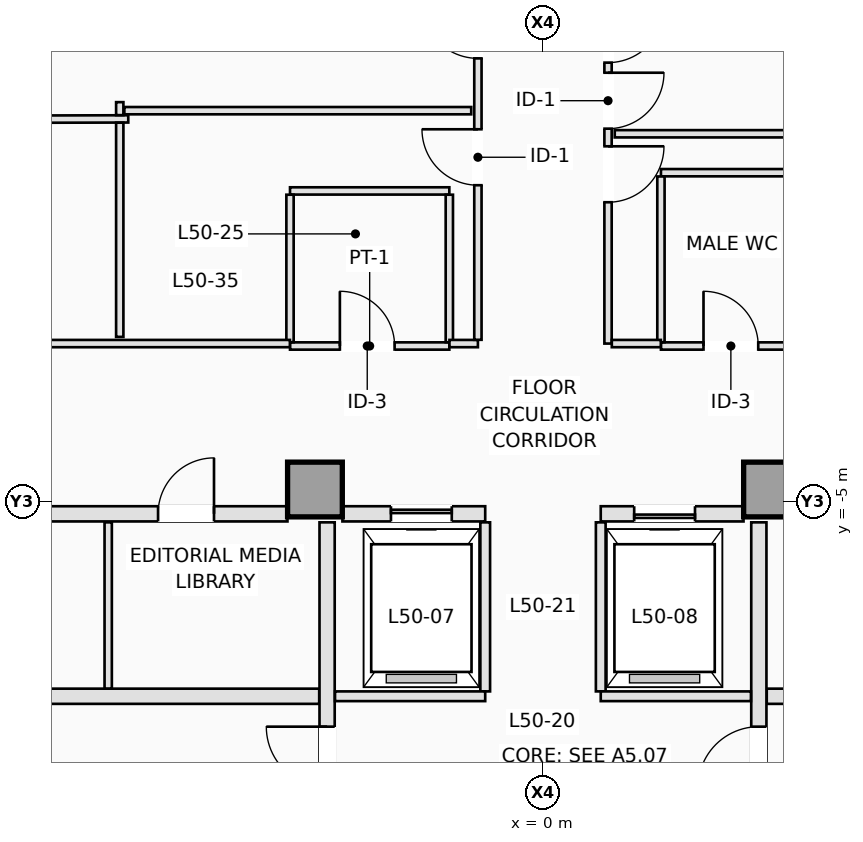
"""IFC4 building model, lengths in metres.
Left out: names, types, materials, properties, quantities, classifications, styles, units other than length and angle.
Written with IfcOpenShell. Run it as: python <this file> out.ifc"""

import sys

from ifc_helpers import new_model, si_unit, direction, frame, frame_2d, origin, origin_2d, place, context, subcontext, project, spatial, rectangle, extrude, element, fill, save


model = new_model("IFC4")
c1 = context("Model", 3, precision=1e-05, world=origin(), true_north=direction((0.0, 1.0)))
c2 = subcontext(c1, "Body", "Model", "MODEL_VIEW")
j1 = project(units=[si_unit("LENGTHUNIT", "METRE"), si_unit("PLANEANGLEUNIT", "RADIAN")], contexts=[c1])
p1 = place(None, origin())
s1 = spatial("IfcSite", under=j1, at=p1, CompositionType="ELEMENT")
p2 = place(p1, origin())
s2 = spatial("IfcBuilding", under=s1, at=p2, CompositionType="ELEMENT")
p3 = place(p2, frame((0.0, 0.0, 183.4)))
s3 = spatial("IfcBuildingStorey", under=s2, at=p3, CompositionType="ELEMENT", Elevation=183.4)
for number, where, z_axis, x_axis in (
    (1, (-3.75, -4.8, 0.0), (0.0, 0.0, 1.0), (1.0, 0.0, 0.0)),
    (2, (3.75, -4.8, 0.0), (0.0, 0.0, 1.0), (1.0, 0.0, 0.0)),
):
    element("IfcColumn", number, at=place(p3, frame(where, z_axis=z_axis, x_axis=x_axis)), inside=s3, PredefinedType="COLUMN", context=c2, shape_type="SweptSolid", body=[
        extrude(rectangle(XDim=0.9, YDim=0.9, at=origin_2d()), origin(), (0.0, 0.0, 1.0), 3.5),
    ])
for number, where, z_axis, x_axis in (
    (3, (-8.92, -8.2, 0.0), (0.0, 0.0, 1.0), (1.0, 0.0, 0.0)),
    (4, (3.68, -8.2, 0.0), (0.0, 0.0, 1.0), (1.0, 0.0, 0.0)),
):
    element("IfcWall", number, at=place(p3, frame(where, z_axis=z_axis, x_axis=x_axis)), inside=s3, PredefinedType="PARTITIONING", context=c2, shape_type="SweptSolid", body=[
        extrude(rectangle(XDim=5.24, YDim=0.25, at=frame_2d((2.62, 0.0))), origin(), (0.0, 0.0, 1.0), 3.25),
    ])
p4 = place(p3, frame((-3.55, -15.898, 0.0), z_axis=(0.0, 0.0, 1.0), x_axis=(0.0, 1.0, 0.0)))
e5 = element("IfcWall", 5, at=p4, inside=s3, PredefinedType="PARTITIONING", context=c2, shape_type="SweptSolid", body=[
    extrude(rectangle(XDim=10.558, YDim=0.25, at=frame_2d((5.279, 0.0))), origin(), (0.0, 0.0, 1.0), 3.25),
])
p5 = place(p4, frame((6.198, 0.0, 0.0)))
e6 = element("IfcOpeningElement", 6, at=p5, cuts=e5, PredefinedType="OPENING", context=c2, shape_type="SweptSolid", body=[
    extrude(rectangle(XDim=1.0, YDim=2.15, at=frame_2d((0.5, 1.075))), frame((0.0, 0.135, 0.0), z_axis=(0.0, -1.0, 0.0), x_axis=(1.0, 0.0, 0.0)), (0.0, 0.0, 1.0), 0.27),
])
p6 = place(p3, frame((3.55, -15.898, 0.0), z_axis=(0.0, 0.0, 1.0), x_axis=(0.0, 1.0, 0.0)))
e7 = element("IfcWall", 7, at=p6, inside=s3, PredefinedType="PARTITIONING", context=c2, shape_type="SweptSolid", body=[
    extrude(rectangle(XDim=10.558, YDim=0.25, at=frame_2d((5.279, 0.0))), origin(), (0.0, 0.0, 1.0), 3.25),
])
p7 = place(p6, frame((6.198, 0.0, 0.0)))
e8 = element("IfcOpeningElement", 8, at=p7, cuts=e7, PredefinedType="OPENING", context=c2, shape_type="SweptSolid", body=[
    extrude(rectangle(XDim=1.0, YDim=2.15, at=frame_2d((0.5, 1.075))), frame((0.0, 0.135, 0.0), z_axis=(0.0, -1.0, 0.0), x_axis=(1.0, 0.0, 0.0)), (0.0, 0.0, 1.0), 0.27),
])
p8 = place(p3, frame((-12.48, -5.2, 0.0), z_axis=(0.0, 0.0, 1.0), x_axis=(1.0, 0.0, 0.0)))
e9 = element("IfcWall", 9, at=p8, inside=s3, PredefinedType="PARTITIONING", context=c2, shape_type="SweptSolid", body=[
    extrude(rectangle(XDim=8.278, YDim=0.25, at=frame_2d((4.139, 0.0))), origin(), (0.0, 0.0, 1.0), 3.25),
])
p9 = place(p8, frame((3.05, 0.0, 0.0)))
e10 = element("IfcOpeningElement", 10, at=p9, cuts=e9, PredefinedType="OPENING", context=c2, shape_type="SweptSolid", body=[
    extrude(rectangle(XDim=0.92, YDim=2.12, at=frame_2d((0.46, 1.06))), frame((0.0, 0.135, 0.0), z_axis=(0.0, -1.0, 0.0), x_axis=(1.0, 0.0, 0.0)), (0.0, 0.0, 1.0), 0.27),
])
p10 = place(p8, frame((6.15, 0.0, 0.0)))
e11 = element("IfcOpeningElement", 11, at=p10, cuts=e9, PredefinedType="OPENING", context=c2, shape_type="SweptSolid", body=[
    extrude(rectangle(XDim=0.92, YDim=2.12, at=frame_2d((0.46, 1.06))), frame((0.0, 0.135, 0.0), z_axis=(0.0, -1.0, 0.0), x_axis=(1.0, 0.0, 0.0)), (0.0, 0.0, 1.0), 0.27),
])
p11 = place(p3, frame((-3.298, -5.2, 0.0), z_axis=(0.0, 0.0, 1.0), x_axis=(1.0, 0.0, 0.0)))
e12 = element("IfcWall", 12, at=p11, inside=s3, PredefinedType="PARTITIONING", context=c2, shape_type="SweptSolid", body=[
    extrude(rectangle(XDim=2.348, YDim=0.25, at=frame_2d((1.174, 0.0))), origin(), (0.0, 0.0, 1.0), 3.25),
])
p12 = place(p11, frame((0.798, 0.0, 0.0)))
e13 = element("IfcOpeningElement", 13, at=p12, cuts=e12, PredefinedType="OPENING", context=c2, shape_type="SweptSolid", body=[
    extrude(rectangle(XDim=1.0, YDim=2.15, at=frame_2d((0.5, 1.075))), frame((0.0, 0.135, 0.0), z_axis=(0.0, -1.0, 0.0), x_axis=(1.0, 0.0, 0.0)), (0.0, 0.0, 1.0), 0.27),
])
p13 = place(p3, frame((0.95, -5.2, 0.0), z_axis=(0.0, 0.0, 1.0), x_axis=(1.0, 0.0, 0.0)))
e14 = element("IfcWall", 14, at=p13, inside=s3, PredefinedType="PARTITIONING", context=c2, shape_type="SweptSolid", body=[
    extrude(rectangle(XDim=2.348, YDim=0.25, at=frame_2d((1.174, 0.0))), origin(), (0.0, 0.0, 1.0), 3.25),
])
p14 = place(p13, frame((0.55, 0.0, 0.0)))
e15 = element("IfcOpeningElement", 15, at=p14, cuts=e14, PredefinedType="OPENING", context=c2, shape_type="SweptSolid", body=[
    extrude(rectangle(XDim=1.0, YDim=2.15, at=frame_2d((0.5, 1.075))), frame((0.0, 0.135, 0.0), z_axis=(0.0, -1.0, 0.0), x_axis=(1.0, 0.0, 0.0)), (0.0, 0.0, 1.0), 0.27),
])
p15 = place(p3, frame((-7.15, -8.073, 0.0), z_axis=(0.0, 0.0, 1.0), x_axis=(0.0, 1.0, 0.0)))
e16 = element("IfcWall", 16, at=p15, inside=s3, PredefinedType="PARTITIONING", context=c2, shape_type="SweptSolid", body=[
    extrude(rectangle(XDim=2.733, YDim=0.12, at=frame_2d((1.366, 0.0))), origin(), (0.0, 0.0, 1.0), 3.25),
])
for number, where, z_axis, x_axis in (
    (17, (-0.95, -8.12, 0.0), (0.0, 0.0, 1.0), (0.0, 1.0, 0.0)),
    (18, (0.95, -8.12, 0.0), (0.0, 0.0, 1.0), (0.0, 1.0, 0.0)),
):
    element("IfcWall", number, at=place(p3, frame(where, z_axis=z_axis, x_axis=x_axis)), inside=s3, PredefinedType="PARTITIONING", context=c2, shape_type="SweptSolid", body=[
        extrude(rectangle(XDim=2.78, YDim=0.16, at=frame_2d((1.39, 0.0))), origin(), (0.0, 0.0, 1.0), 3.25),
    ])
for number, where, z_axis, x_axis in (
    (19, (-3.42, -8.2, 0.0), (0.0, 0.0, 1.0), (1.0, 0.0, 0.0)),
    (20, (0.95, -8.2, 0.0), (0.0, 0.0, 1.0), (1.0, 0.0, 0.0)),
):
    element("IfcWall", number, at=place(p3, frame(where, z_axis=z_axis, x_axis=x_axis)), inside=s3, PredefinedType="PARTITIONING", context=c2, shape_type="SweptSolid", body=[
        extrude(rectangle(XDim=2.47, YDim=0.16, at=frame_2d((1.235, 0.0))), origin(), (0.0, 0.0, 1.0), 3.25),
    ])
p16 = place(p3, frame((-4.16, -2.44, 0.0), z_axis=(0.0, 0.0, 1.0), x_axis=(1.0, 0.0, 0.0)))
e21 = element("IfcWall", 21, at=p16, inside=s3, PredefinedType="PARTITIONING", context=c2, shape_type="SweptSolid", body=[
    extrude(rectangle(XDim=2.62, YDim=0.12, at=frame_2d((1.31, 0.0))), origin(), (0.0, 0.0, 1.0), 2.943),
])
p17 = place(p16, frame((0.82, 0.0, 0.0)))
e22 = element("IfcOpeningElement", 22, at=p17, cuts=e21, PredefinedType="OPENING", context=c2, shape_type="SweptSolid", body=[
    extrude(rectangle(XDim=0.9, YDim=2.12, at=frame_2d((0.45, 1.06))), frame((0.0, 0.07, 0.0), z_axis=(0.0, -1.0, 0.0), x_axis=(1.0, 0.0, 0.0)), (0.0, 0.0, 1.0), 0.14),
])
p18 = place(p3, frame((-4.16, 0.11, 0.0), z_axis=(0.0, 0.0, 1.0), x_axis=(1.0, 0.0, 0.0)))
e23 = element("IfcWall", 23, at=p18, inside=s3, PredefinedType="PARTITIONING", context=c2, shape_type="SweptSolid", body=[
    extrude(rectangle(XDim=2.62, YDim=0.12, at=frame_2d((1.31, 0.0))), origin(), (0.0, 0.0, 1.0), 3.25),
])
for number, where, z_axis, x_axis in (
    (24, (-4.16, -2.378, 0.0), (0.0, 0.0, 1.0), (0.0, 1.0, 0.0)),
    (25, (-1.54, -2.378, 0.0), (0.0, 0.0, 1.0), (0.0, 1.0, 0.0)),
):
    element("IfcWall", number, at=place(p3, frame(where, z_axis=z_axis, x_axis=x_axis)), inside=s3, PredefinedType="PARTITIONING", context=c2, shape_type="SweptSolid", body=[
        extrude(rectangle(XDim=2.426, YDim=0.12, at=frame_2d((1.213, 0.0))), origin(), (0.0, 0.0, 1.0), 3.25),
    ])
p19 = place(p3, frame((1.94, -2.44, 0.0), z_axis=(0.0, 0.0, 1.0), x_axis=(1.0, 0.0, 0.0)))
e26 = element("IfcWall", 26, at=p19, inside=s3, PredefinedType="PARTITIONING", context=c2, shape_type="SweptSolid", body=[
    extrude(rectangle(XDim=4.57, YDim=0.12, at=frame_2d((2.285, 0.0))), origin(), (0.0, 0.0, 1.0), 2.943),
])
p20 = place(p19, frame((0.7, 0.0, 0.0)))
e27 = element("IfcOpeningElement", 27, at=p20, cuts=e26, PredefinedType="OPENING", context=c2, shape_type="SweptSolid", body=[
    extrude(rectangle(XDim=0.9, YDim=2.12, at=frame_2d((0.45, 1.06))), frame((0.0, 0.07, 0.0), z_axis=(0.0, -1.0, 0.0), x_axis=(1.0, 0.0, 0.0)), (0.0, 0.0, 1.0), 0.14),
])
p21 = place(p19, frame((2.98, 0.0, 0.0)))
e28 = element("IfcOpeningElement", 28, at=p21, cuts=e26, PredefinedType="OPENING", context=c2, shape_type="SweptSolid", body=[
    extrude(rectangle(XDim=0.9, YDim=2.12, at=frame_2d((0.45, 1.06))), frame((0.0, 0.07, 0.0), z_axis=(0.0, -1.0, 0.0), x_axis=(1.0, 0.0, 0.0)), (0.0, 0.0, 1.0), 0.14),
])
p22 = place(p3, frame((1.94, 0.41, 0.0), z_axis=(0.0, 0.0, 1.0), x_axis=(1.0, 0.0, 0.0)))
e29 = element("IfcWall", 29, at=p22, inside=s3, PredefinedType="PARTITIONING", context=c2, shape_type="SweptSolid", body=[
    extrude(rectangle(XDim=4.57, YDim=0.12, at=frame_2d((2.285, 0.0))), origin(), (0.0, 0.0, 1.0), 3.25),
])
p23 = place(p3, frame((1.94, -2.378, 0.0), z_axis=(0.0, 0.0, 1.0), x_axis=(0.0, 1.0, 0.0)))
e30 = element("IfcWall", 30, at=p23, inside=s3, PredefinedType="PARTITIONING", context=c2, shape_type="SweptSolid", body=[
    extrude(rectangle(XDim=2.726, YDim=0.12, at=frame_2d((1.363, 0.0))), origin(), (0.0, 0.0, 1.0), 3.25),
])
p24 = place(p3, frame((-12.348, -2.4, 0.0), z_axis=(0.0, 0.0, 1.0), x_axis=(1.0, 0.0, 0.0)))
e31 = element("IfcWall", 31, at=p24, inside=s3, PredefinedType="PARTITIONING", context=c2, shape_type="SweptSolid", body=[
    extrude(rectangle(XDim=8.186, YDim=0.12, at=frame_2d((4.093, 0.0))), origin(), (0.0, 0.0, 1.0), 3.25),
])
p25 = place(p3, frame((-1.538, -2.4, 0.0), z_axis=(0.0, 0.0, 1.0), x_axis=(1.0, 0.0, 0.0)))
e32 = element("IfcWall", 32, at=p25, inside=s3, PredefinedType="PARTITIONING", context=c2, shape_type="SweptSolid", body=[
    extrude(rectangle(XDim=0.468, YDim=0.12, at=frame_2d((0.234, 0.0))), origin(), (0.0, 0.0, 1.0), 2.943),
])
p26 = place(p3, frame((-1.07, -2.338, 0.0), z_axis=(0.0, 0.0, 1.0), x_axis=(0.0, 1.0, 0.0)))
e33 = element("IfcWall", 33, at=p26, inside=s3, PredefinedType="PARTITIONING", context=c2, shape_type="SweptSolid", body=[
    extrude(rectangle(XDim=12.788, YDim=0.12, at=frame_2d((6.394, 0.0))), origin(), (0.0, 0.0, 1.0), 3.25),
])
p27 = place(p26, frame((10.904, 0.0, 0.0)))
e34 = element("IfcOpeningElement", 34, at=p27, cuts=e33, PredefinedType="OPENING", context=c2, shape_type="SweptSolid", body=[
    extrude(rectangle(XDim=0.92, YDim=2.12, at=frame_2d((0.46, 1.06))), frame((0.0, 0.07, 0.0), z_axis=(0.0, -1.0, 0.0), x_axis=(1.0, 0.0, 0.0)), (0.0, 0.0, 1.0), 0.14),
])
p28 = place(p26, frame((7.228, 0.0, 0.0)))
e35 = element("IfcOpeningElement", 35, at=p28, cuts=e33, PredefinedType="OPENING", context=c2, shape_type="SweptSolid", body=[
    extrude(rectangle(XDim=0.92, YDim=2.12, at=frame_2d((0.46, 1.06))), frame((0.0, 0.07, 0.0), z_axis=(0.0, -1.0, 0.0), x_axis=(1.0, 0.0, 0.0)), (0.0, 0.0, 1.0), 0.14),
])
p29 = place(p26, frame((4.628, 0.0, 0.0)))
e36 = element("IfcOpeningElement", 36, at=p29, cuts=e33, PredefinedType="OPENING", context=c2, shape_type="SweptSolid", body=[
    extrude(rectangle(XDim=0.92, YDim=2.12, at=frame_2d((0.46, 1.06))), frame((0.0, 0.07, 0.0), z_axis=(0.0, -1.0, 0.0), x_axis=(1.0, 0.0, 0.0)), (0.0, 0.0, 1.0), 0.14),
])
p30 = place(p26, frame((2.542, 0.0, 0.0)))
e37 = element("IfcOpeningElement", 37, at=p30, cuts=e33, PredefinedType="OPENING", context=c2, shape_type="SweptSolid", body=[
    extrude(rectangle(XDim=0.92, YDim=2.12, at=frame_2d((0.46, 1.06))), frame((0.0, 0.07, 0.0), z_axis=(0.0, -1.0, 0.0), x_axis=(1.0, 0.0, 0.0)), (0.0, 0.0, 1.0), 0.14),
])
p31 = place(p3, frame((1.07, 10.388, 0.0), z_axis=(0.0, 0.0, 1.0), x_axis=(0.0, -1.0, 0.0)))
e38 = element("IfcWall", 38, at=p31, inside=s3, PredefinedType="PARTITIONING", context=c2, shape_type="SweptSolid", body=[
    extrude(rectangle(XDim=12.788, YDim=0.12, at=frame_2d((6.394, 0.0))), origin(), (0.0, 0.0, 1.0), 3.25),
])
p32 = place(p31, frame((4.548, 0.0, 0.0)))
e39 = element("IfcOpeningElement", 39, at=p32, cuts=e38, PredefinedType="OPENING", context=c2, shape_type="SweptSolid", body=[
    extrude(rectangle(XDim=0.92, YDim=2.12, at=frame_2d((0.46, 1.06))), frame((0.0, 0.07, 0.0), z_axis=(0.0, -1.0, 0.0), x_axis=(1.0, 0.0, 0.0)), (0.0, 0.0, 1.0), 0.14),
])
p33 = place(p31, frame((8.334, 0.0, 0.0)))
e40 = element("IfcOpeningElement", 40, at=p33, cuts=e38, PredefinedType="OPENING", context=c2, shape_type="SweptSolid", body=[
    extrude(rectangle(XDim=0.92, YDim=2.12, at=frame_2d((0.46, 1.06))), frame((0.0, 0.07, 0.0), z_axis=(0.0, -1.0, 0.0), x_axis=(1.0, 0.0, 0.0)), (0.0, 0.0, 1.0), 0.14),
])
p34 = place(p31, frame((7.248, 0.0, 0.0)))
e41 = element("IfcOpeningElement", 41, at=p34, cuts=e38, PredefinedType="OPENING", context=c2, shape_type="SweptSolid", body=[
    extrude(rectangle(XDim=0.92, YDim=2.12, at=frame_2d((0.46, 1.06))), frame((0.0, 0.07, 0.0), z_axis=(0.0, -1.0, 0.0), x_axis=(1.0, 0.0, 0.0)), (0.0, 0.0, 1.0), 0.14),
])
p35 = place(p31, frame((9.544, 0.0, 0.0)))
e42 = element("IfcOpeningElement", 42, at=p35, cuts=e38, PredefinedType="OPENING", context=c2, shape_type="SweptSolid", body=[
    extrude(rectangle(XDim=0.92, YDim=2.12, at=frame_2d((0.46, 1.06))), frame((0.0, 0.07, 0.0), z_axis=(0.0, -1.0, 0.0), x_axis=(1.0, 0.0, 0.0)), (0.0, 0.0, 1.0), 0.14),
])
p36 = place(p3, frame((1.132, -2.4, 0.0), z_axis=(0.0, 0.0, 1.0), x_axis=(1.0, 0.0, 0.0)))
e43 = element("IfcWall", 43, at=p36, inside=s3, PredefinedType="PARTITIONING", context=c2, shape_type="SweptSolid", body=[
    extrude(rectangle(XDim=0.806, YDim=0.12, at=frame_2d((0.403, 0.0))), origin(), (0.0, 0.0, 1.0), 2.943),
])
p37 = place(p3, frame((1.18, 1.05, 0.0), z_axis=(0.0, 0.0, 1.0), x_axis=(1.0, 0.0, 0.0)))
e44 = element("IfcWall", 44, at=p37, inside=s3, PredefinedType="PARTITIONING", context=c2, shape_type="SweptSolid", body=[
    extrude(rectangle(XDim=5.41, YDim=0.12, at=frame_2d((2.705, 0.0))), origin(), (0.0, 0.0, 1.0), 3.25),
])
p38 = place(p3, frame((-1.18, 1.43, 0.0), z_axis=(0.0, 0.0, 1.0), x_axis=(-1.0, 0.0, 0.0)))
e45 = element("IfcWall", 45, at=p38, inside=s3, PredefinedType="PARTITIONING", context=c2, shape_type="SweptSolid", body=[
    extrude(rectangle(XDim=5.705, YDim=0.12, at=frame_2d((2.852, 0.0))), origin(), (0.0, 0.0, 1.0), 2.943),
])
p39 = place(p3, frame((-6.82, 1.295, 0.0), z_axis=(0.0, 0.0, 1.0), x_axis=(-0.99999659811, -0.002608403256, 0.0)))
e46 = element("IfcWall", 46, at=p39, inside=s3, PredefinedType="PARTITIONING", context=c2, shape_type="SweptSolid", body=[
    extrude(rectangle(XDim=5.99, YDim=0.12, at=frame_2d((2.995, 0.0))), origin(), (0.0, 0.0, 1.0), 3.25),
])
p40 = place(p3, frame((-6.96, -2.29, 0.0), z_axis=(0.0, 0.0, 1.0), x_axis=(0.0, 1.0, 0.0)))
e47 = element("IfcWall", 47, at=p40, inside=s3, PredefinedType="PARTITIONING", context=c2, shape_type="SweptSolid", body=[
    extrude(rectangle(XDim=3.522, YDim=0.12, at=frame_2d((1.761, 0.0))), origin(), (0.0, 0.0, 1.0), 3.25),
])
p41 = place(p3, frame((-6.96, 1.356, 0.0), z_axis=(0.0, 0.0, 1.0), x_axis=(0.0, 1.0, 0.0)))
e48 = element("IfcWall", 48, at=p41, inside=s3, PredefinedType="PARTITIONING", context=c2, shape_type="SweptSolid", body=[
    extrude(rectangle(XDim=0.214, YDim=0.12, at=frame_2d((0.107, 0.0))), origin(), (0.0, 0.0, 1.0), 3.25),
])
p42 = place(p12, origin())
e49 = element("IfcDoor", 49, at=p42, inside=s3, OperationType="SLIDING_TO_LEFT", PredefinedType="DOOR", context=c2, shape_type="SweptSolid", body=[
    extrude(rectangle(XDim=1.0, YDim=2.15, at=frame_2d((0.5, 1.075))), frame((0.0, 0.025, 0.0), z_axis=(0.0, -1.0, 0.0), x_axis=(1.0, 0.0, 0.0)), (0.0, 0.0, 1.0), 0.05),
])
fill(e13, e49)
p43 = place(p14, origin())
e50 = element("IfcDoor", 50, at=p43, inside=s3, OperationType="SLIDING_TO_RIGHT", PredefinedType="DOOR", context=c2, shape_type="SweptSolid", body=[
    extrude(rectangle(XDim=1.0, YDim=2.15, at=frame_2d((0.5, 1.075))), frame((0.0, 0.025, 0.0), z_axis=(0.0, -1.0, 0.0), x_axis=(1.0, 0.0, 0.0)), (0.0, 0.0, 1.0), 0.05),
])
fill(e15, e50)
p44 = place(p5, origin())
e51 = element("IfcDoor", 51, at=p44, inside=s3, OperationType="SINGLE_SWING_RIGHT", PredefinedType="DOOR", context=c2, shape_type="SweptSolid", body=[
    extrude(rectangle(XDim=1.0, YDim=2.15, at=frame_2d((0.5, 1.075))), frame((0.0, 0.025, 0.0), z_axis=(0.0, -1.0, 0.0), x_axis=(1.0, 0.0, 0.0)), (0.0, 0.0, 1.0), 0.05),
])
fill(e6, e51)
p45 = place(p7, origin())
e52 = element("IfcDoor", 52, at=p45, inside=s3, OperationType="SINGLE_SWING_LEFT", PredefinedType="DOOR", context=c2, shape_type="SweptSolid", body=[
    extrude(rectangle(XDim=1.0, YDim=2.15, at=frame_2d((0.5, 1.075))), frame((0.0, 0.025, 0.0), z_axis=(0.0, -1.0, 0.0), x_axis=(1.0, 0.0, 0.0)), (0.0, 0.0, 1.0), 0.05),
])
fill(e8, e52)
p46 = place(p10, origin())
e53 = element("IfcDoor", 53, at=p46, inside=s3, OperationType="SINGLE_SWING_RIGHT", PredefinedType="DOOR", context=c2, shape_type="SweptSolid", body=[
    extrude(rectangle(XDim=0.92, YDim=2.12, at=frame_2d((0.46, 1.06))), frame((0.0, 0.025, 0.0), z_axis=(0.0, -1.0, 0.0), x_axis=(1.0, 0.0, 0.0)), (0.0, 0.0, 1.0), 0.05),
])
fill(e11, e53)
p47 = place(p17, origin())
e54 = element("IfcDoor", 54, at=p47, inside=s3, OperationType="SINGLE_SWING_LEFT", PredefinedType="DOOR", context=c2, shape_type="SweptSolid", body=[
    extrude(rectangle(XDim=0.9, YDim=2.12, at=frame_2d((0.45, 1.06))), frame((0.0, 0.025, 0.0), z_axis=(0.0, -1.0, 0.0), x_axis=(1.0, 0.0, 0.0)), (0.0, 0.0, 1.0), 0.05),
])
fill(e22, e54)
p48 = place(p20, origin())
e55 = element("IfcDoor", 55, at=p48, inside=s3, OperationType="SINGLE_SWING_LEFT", PredefinedType="DOOR", context=c2, shape_type="SweptSolid", body=[
    extrude(rectangle(XDim=0.9, YDim=2.12, at=frame_2d((0.45, 1.06))), frame((0.0, 0.025, 0.0), z_axis=(0.0, -1.0, 0.0), x_axis=(1.0, 0.0, 0.0)), (0.0, 0.0, 1.0), 0.05),
])
fill(e27, e55)
p49 = place(p33, origin())
e56 = element("IfcDoor", 56, at=p49, inside=s3, OperationType="SINGLE_SWING_LEFT", PredefinedType="DOOR", context=c2, shape_type="SweptSolid", body=[
    extrude(rectangle(XDim=0.92, YDim=2.12, at=frame_2d((0.46, 1.06))), frame((0.0, 0.025, 0.0), z_axis=(0.0, -1.0, 0.0), x_axis=(1.0, 0.0, 0.0)), (0.0, 0.0, 1.0), 0.05),
])
fill(e40, e56)
p50 = place(p29, origin())
e57 = element("IfcDoor", 57, at=p50, inside=s3, OperationType="SINGLE_SWING_RIGHT", PredefinedType="DOOR", context=c2, shape_type="SweptSolid", body=[
    extrude(rectangle(XDim=0.92, YDim=2.12, at=frame_2d((0.46, 1.06))), frame((0.0, 0.025, 0.0), z_axis=(0.0, -1.0, 0.0), x_axis=(1.0, 0.0, 0.0)), (0.0, 0.0, 1.0), 0.05),
])
fill(e36, e57)
p51 = place(p34, origin())
e58 = element("IfcDoor", 58, at=p51, inside=s3, OperationType="SINGLE_SWING_LEFT", PredefinedType="DOOR", context=c2, shape_type="SweptSolid", body=[
    extrude(rectangle(XDim=0.92, YDim=2.12, at=frame_2d((0.46, 1.06))), frame((0.0, 0.025, 0.0), z_axis=(0.0, -1.0, 0.0), x_axis=(1.0, 0.0, 0.0)), (0.0, 0.0, 1.0), 0.05),
])
fill(e41, e58)
p52 = place(p30, origin())
e59 = element("IfcDoor", 59, at=p52, inside=s3, OperationType="SINGLE_SWING_RIGHT", PredefinedType="DOOR", context=c2, shape_type="SweptSolid", body=[
    extrude(rectangle(XDim=0.92, YDim=2.12, at=frame_2d((0.46, 1.06))), frame((0.0, 0.025, 0.0), z_axis=(0.0, -1.0, 0.0), x_axis=(1.0, 0.0, 0.0)), (0.0, 0.0, 1.0), 0.05),
])
fill(e37, e59)
p53 = place(p35, origin())
e60 = element("IfcDoor", 60, at=p53, inside=s3, OperationType="SINGLE_SWING_LEFT", PredefinedType="DOOR", context=c2, shape_type="SweptSolid", body=[
    extrude(rectangle(XDim=0.92, YDim=2.12, at=frame_2d((0.46, 1.06))), frame((0.0, 0.025, 0.0), z_axis=(0.0, -1.0, 0.0), x_axis=(1.0, 0.0, 0.0)), (0.0, 0.0, 1.0), 0.05),
])
fill(e42, e60)
save(model, sys.argv[1])
